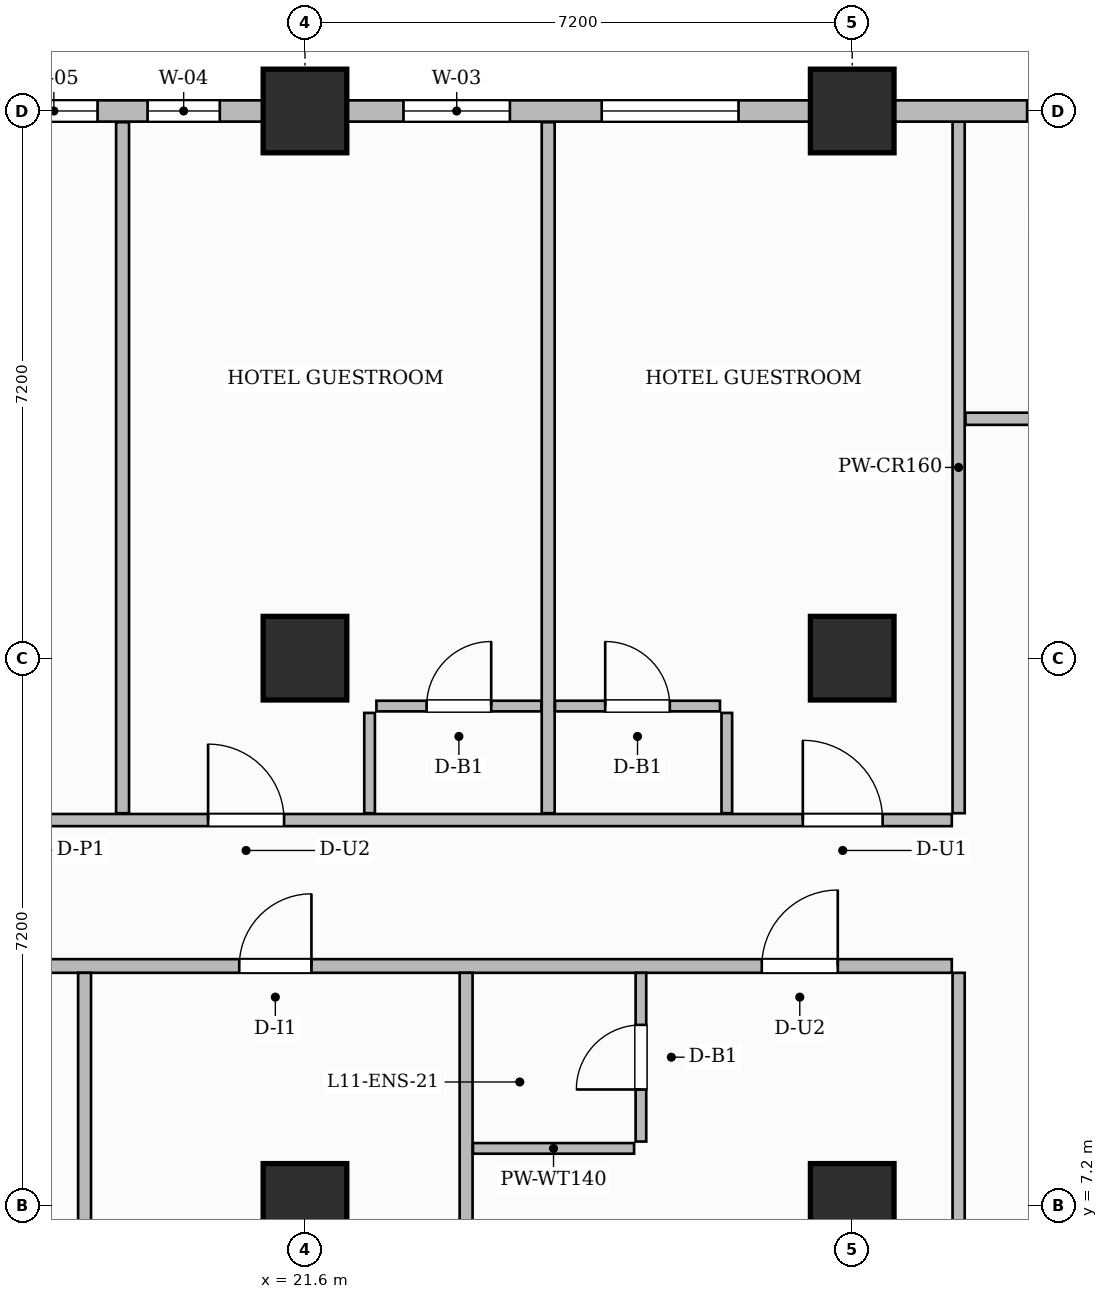
"""IFC4 building model, lengths in metres.
Left out: names, types, materials, properties, quantities, classifications, styles, units other than length and angle.
Written with IfcOpenShell. Run it as: python <this file> out.ifc"""

import sys

from ifc_helpers import new_model, si_unit, direction, frame, frame_2d, origin, origin_2d, place, context, subcontext, project, spatial, rectangle, extrude, source, transform, mapped, element, fill, save


model = new_model("IFC4")
c1 = context("Model", 3, precision=1e-05, world=origin(), true_north=direction((0.0, 1.0)))
c2 = subcontext(c1, "Body", "Model", "MODEL_VIEW")
j1 = project(units=[si_unit("LENGTHUNIT", "METRE"), si_unit("PLANEANGLEUNIT", "RADIAN")], contexts=[c1])
p1 = place(None, origin())
s1 = spatial("IfcSite", under=j1, at=p1, CompositionType="ELEMENT")
p2 = place(p1, origin())
s2 = spatial("IfcBuilding", under=s1, at=p2, CompositionType="ELEMENT")
p3 = place(p2, frame((0.0, 0.0, 50.9)))
s3 = spatial("IfcBuildingStorey", under=s2, at=p3, CompositionType="ELEMENT", Elevation=50.9)
m1 = source(origin(), c2, "Body", "SweptSolid", [
    extrude(rectangle(XDim=1.1, YDim=1.1, at=origin_2d()), origin(), (0.0, 0.0, 1.0), 3.7),
])
for number, where, z_axis, x_axis in (
    (1, (21.6, 7.2, 0.0), (0.0, 0.0, 1.0), (1.0, 0.0, 0.0)),
    (2, (21.6, 14.4, 0.0), (0.0, 0.0, 1.0), (1.0, 0.0, 0.0)),
    (3, (21.6, 21.6, 0.0), (0.0, 0.0, 1.0), (1.0, 0.0, 0.0)),
    (4, (28.8, 7.2, 0.0), (0.0, 0.0, 1.0), (1.0, 0.0, 0.0)),
    (5, (28.8, 14.4, 0.0), (0.0, 0.0, 1.0), (1.0, 0.0, 0.0)),
    (6, (28.8, 21.6, 0.0), (0.0, 0.0, 1.0), (1.0, 0.0, 0.0)),
):
    element("IfcColumn", number, at=place(p3, frame(where, z_axis=z_axis, x_axis=x_axis)), inside=s3, PredefinedType="COLUMN", context=c2, shape_type="MappedRepresentation", body=[
        mapped(m1, transform((0.0, 0.0, 0.0), scale=1.0)),
    ])
p4 = place(p3, frame((14.548, 10.35, 0.0), z_axis=(0.0, 0.0, 1.0), x_axis=(1.0, 0.0, 0.0)))
e7 = element("IfcWall", 7, at=p4, inside=s3, PredefinedType="PARTITIONING", context=c2, shape_type="SweptSolid", body=[
    extrude(rectangle(XDim=15.562, YDim=0.18, at=frame_2d((7.781, 0.0))), origin(), (0.0, 0.0, 1.0), 3.45),
])
p5 = place(p4, frame((1.302, 0.0, 0.0)))
e8 = element("IfcOpeningElement", 8, at=p5, cuts=e7, PredefinedType="OPENING", context=c2, shape_type="SweptSolid", body=[
    extrude(rectangle(XDim=1.4, YDim=2.35, at=frame_2d((0.7, 1.175))), frame((0.0, 0.1, 0.0), z_axis=(0.0, -1.0, 0.0), x_axis=(1.0, 0.0, 0.0)), (0.0, 0.0, 1.0), 0.2),
])
p6 = place(p4, frame((6.187, 0.0, 0.0)))
e9 = element("IfcOpeningElement", 9, at=p6, cuts=e7, PredefinedType="OPENING", context=c2, shape_type="SweptSolid", body=[
    extrude(rectangle(XDim=0.95, YDim=2.15, at=frame_2d((0.475, 1.075))), frame((0.0, 0.1, 0.0), z_axis=(0.0, -1.0, 0.0), x_axis=(1.0, 0.0, 0.0)), (0.0, 0.0, 1.0), 0.2),
])
p7 = place(p4, frame((13.062, 0.0, 0.0)))
e10 = element("IfcOpeningElement", 10, at=p7, cuts=e7, PredefinedType="OPENING", context=c2, shape_type="SweptSolid", body=[
    extrude(rectangle(XDim=1.0, YDim=2.2, at=frame_2d((0.5, 1.1))), frame((0.0, 0.1, 0.0), z_axis=(0.0, -1.0, 0.0), x_axis=(1.0, 0.0, 0.0)), (0.0, 0.0, 1.0), 0.2),
])
p8 = place(p3, frame((14.548, 12.27, 0.0), z_axis=(0.0, 0.0, 1.0), x_axis=(1.0, 0.0, 0.0)))
e11 = element("IfcWall", 11, at=p8, inside=s3, PredefinedType="PARTITIONING", context=c2, shape_type="SweptSolid", body=[
    extrude(rectangle(XDim=15.562, YDim=0.16, at=frame_2d((7.781, 0.0))), origin(), (0.0, 0.0, 1.0), 3.45),
])
p9 = place(p8, frame((1.602, 0.0, 0.0)))
e12 = element("IfcOpeningElement", 12, at=p9, cuts=e11, PredefinedType="OPENING", context=c2, shape_type="SweptSolid", body=[
    extrude(rectangle(XDim=1.4, YDim=2.35, at=frame_2d((0.7, 1.175))), frame((0.0, 0.09, 0.0), z_axis=(0.0, -1.0, 0.0), x_axis=(1.0, 0.0, 0.0)), (0.0, 0.0, 1.0), 0.18),
])
p10 = place(p8, frame((5.777, 0.0, 0.0)))
e13 = element("IfcOpeningElement", 13, at=p10, cuts=e11, PredefinedType="OPENING", context=c2, shape_type="SweptSolid", body=[
    extrude(rectangle(XDim=1.0, YDim=2.2, at=frame_2d((0.5, 1.1))), frame((0.0, 0.09, 0.0), z_axis=(0.0, -1.0, 0.0), x_axis=(1.0, 0.0, 0.0)), (0.0, 0.0, 1.0), 0.18),
])
p11 = place(p8, frame((13.602, 0.0, 0.0)))
e14 = element("IfcOpeningElement", 14, at=p11, cuts=e11, PredefinedType="OPENING", context=c2, shape_type="SweptSolid", body=[
    extrude(rectangle(XDim=1.05, YDim=2.25, at=frame_2d((0.525, 1.125))), frame((0.0, 0.09, 0.0), z_axis=(0.0, -1.0, 0.0), x_axis=(1.0, 0.0, 0.0)), (0.0, 0.0, 1.0), 0.18),
])
p12 = place(p3, frame((30.2, 12.36, 0.0), z_axis=(0.0, 0.0, 1.0), x_axis=(0.0, 1.0, 0.0)))
e15 = element("IfcWall", 15, at=p12, inside=s3, PredefinedType="PARTITIONING", context=c2, shape_type="SweptSolid", body=[
    extrude(rectangle(XDim=9.1, YDim=0.16, at=frame_2d((4.55, 0.0))), origin(), (0.0, 0.0, 1.0), 3.45),
])
p13 = place(p3, frame((30.29, 17.55, 0.0), z_axis=(0.0, 0.0, 1.0), x_axis=(1.0, 0.0, 0.0)))
e16 = element("IfcWall", 16, at=p13, inside=s3, PredefinedType="PARTITIONING", context=c2, shape_type="SweptSolid", body=[
    extrude(rectangle(XDim=19.37, YDim=0.16, at=frame_2d((9.685, 0.0))), origin(), (0.0, 0.0, 1.0), 3.45),
])
p14 = place(p13, frame((1.285, 0.0, 0.0)))
e17 = element("IfcOpeningElement", 17, at=p14, cuts=e16, PredefinedType="OPENING", context=c2, shape_type="SweptSolid", body=[
    extrude(rectangle(XDim=0.85, YDim=2.1, at=frame_2d((0.425, 1.05))), frame((0.0, 0.09, 0.0), z_axis=(0.0, -1.0, 0.0), x_axis=(1.0, 0.0, 0.0)), (0.0, 0.0, 1.0), 0.18),
])
p15 = place(p13, frame((10.66, 0.0, 0.0)))
e18 = element("IfcOpeningElement", 18, at=p15, cuts=e16, PredefinedType="OPENING", context=c2, shape_type="SweptSolid", body=[
    extrude(rectangle(XDim=1.6, YDim=2.4, at=frame_2d((0.8, 1.2))), frame((0.0, 0.09, 0.0), z_axis=(0.0, -1.0, 0.0), x_axis=(1.0, 0.0, 0.0)), (0.0, 0.0, 1.0), 0.18),
])
p16 = place(p3, frame((30.2, 0.148, 0.0), z_axis=(0.0, 0.0, 1.0), x_axis=(0.0, 1.0, 0.0)))
e19 = element("IfcWall", 19, at=p16, inside=s3, PredefinedType="PARTITIONING", context=c2, shape_type="SweptSolid", body=[
    extrude(rectangle(XDim=10.112, YDim=0.16, at=frame_2d((5.056, 0.0))), origin(), (0.0, 0.0, 1.0), 3.45),
])
p17 = place(p16, frame((1.977, 0.0, 0.0)))
e20 = element("IfcOpeningElement", 20, at=p17, cuts=e19, PredefinedType="OPENING", context=c2, shape_type="SweptSolid", body=[
    extrude(rectangle(XDim=1.05, YDim=2.15, at=frame_2d((0.525, 1.075))), frame((0.0, 0.09, 0.0), z_axis=(0.0, -1.0, 0.0), x_axis=(1.0, 0.0, 0.0)), (0.0, 0.0, 1.0), 0.18),
])
for number, where, z_axis, x_axis in (
    (21, (18.7, 0.148, 0.0), (0.0, 0.0, 1.0), (0.0, 1.0, 0.0)),
    (22, (23.72, 0.148, 0.0), (0.0, 0.0, 1.0), (0.0, 1.0, 0.0)),
):
    element("IfcWall", number, at=place(p3, frame(where, z_axis=z_axis, x_axis=x_axis)), inside=s3, PredefinedType="PARTITIONING", context=c2, shape_type="SweptSolid", body=[
        extrude(rectangle(XDim=10.112, YDim=0.17, at=frame_2d((5.056, 0.0))), origin(), (0.0, 0.0, 1.0), 3.45),
    ])
p18 = place(p3, frame((26.02, 8.04, 0.0), z_axis=(0.0, 0.0, 1.0), x_axis=(0.0, 1.0, 0.0)))
e23 = element("IfcWall", 23, at=p18, inside=s3, PredefinedType="PARTITIONING", context=c2, shape_type="SweptSolid", body=[
    extrude(rectangle(XDim=2.22, YDim=0.14, at=frame_2d((1.11, 0.0))), origin(), (0.0, 0.0, 1.0), 3.45),
])
p19 = place(p18, frame((0.685, 0.0, 0.0)))
e24 = element("IfcOpeningElement", 24, at=p19, cuts=e23, PredefinedType="OPENING", context=c2, shape_type="SweptSolid", body=[
    extrude(rectangle(XDim=0.85, YDim=2.1, at=frame_2d((0.425, 1.05))), frame((0.0, 0.08, 0.0), z_axis=(0.0, -1.0, 0.0), x_axis=(1.0, 0.0, 0.0)), (0.0, 0.0, 1.0), 0.16),
])
p20 = place(p3, frame((23.81, 7.95, 0.0), z_axis=(0.0, 0.0, 1.0), x_axis=(1.0, 0.0, 0.0)))
e25 = element("IfcWall", 25, at=p20, inside=s3, PredefinedType="PARTITIONING", context=c2, shape_type="SweptSolid", body=[
    extrude(rectangle(XDim=2.12, YDim=0.14, at=frame_2d((1.06, 0.0))), origin(), (0.0, 0.0, 1.0), 3.45),
])
for number, where, z_axis, x_axis in (
    (26, (19.2, 12.36, 0.0), (0.0, 0.0, 1.0), (0.0, 1.0, 0.0)),
    (27, (24.8, 12.36, 0.0), (0.0, 0.0, 1.0), (0.0, 1.0, 0.0)),
):
    element("IfcWall", number, at=place(p3, frame(where, z_axis=z_axis, x_axis=x_axis)), inside=s3, PredefinedType="PARTITIONING", context=c2, shape_type="SweptSolid", body=[
        extrude(rectangle(XDim=9.092, YDim=0.17, at=frame_2d((4.546, 0.0))), origin(), (0.0, 0.0, 1.0), 3.45),
    ])
p21 = place(p3, frame((22.45, 12.36, 0.0), z_axis=(0.0, 0.0, 1.0), x_axis=(0.0, 1.0, 0.0)))
e28 = element("IfcWall", 28, at=p21, inside=s3, PredefinedType="PARTITIONING", context=c2, shape_type="SweptSolid", body=[
    extrude(rectangle(XDim=1.32, YDim=0.14, at=frame_2d((0.66, 0.0))), origin(), (0.0, 0.0, 1.0), 3.45),
])
p22 = place(p3, frame((22.54, 13.77, 0.0), z_axis=(0.0, 0.0, 1.0), x_axis=(1.0, 0.0, 0.0)))
e29 = element("IfcWall", 29, at=p22, inside=s3, PredefinedType="PARTITIONING", context=c2, shape_type="SweptSolid", body=[
    extrude(rectangle(XDim=2.17, YDim=0.14, at=frame_2d((1.085, 0.0))), origin(), (0.0, 0.0, 1.0), 3.45),
])
p23 = place(p22, frame((0.66, 0.0, 0.0)))
e30 = element("IfcOpeningElement", 30, at=p23, cuts=e29, PredefinedType="OPENING", context=c2, shape_type="SweptSolid", body=[
    extrude(rectangle(XDim=0.85, YDim=2.1, at=frame_2d((0.425, 1.05))), frame((0.0, 0.08, 0.0), z_axis=(0.0, -1.0, 0.0), x_axis=(1.0, 0.0, 0.0)), (0.0, 0.0, 1.0), 0.16),
])
p24 = place(p3, frame((27.15, 12.36, 0.0), z_axis=(0.0, 0.0, 1.0), x_axis=(0.0, 1.0, 0.0)))
e31 = element("IfcWall", 31, at=p24, inside=s3, PredefinedType="PARTITIONING", context=c2, shape_type="SweptSolid", body=[
    extrude(rectangle(XDim=1.32, YDim=0.14, at=frame_2d((0.66, 0.0))), origin(), (0.0, 0.0, 1.0), 3.45),
])
p25 = place(p3, frame((24.89, 13.77, 0.0), z_axis=(0.0, 0.0, 1.0), x_axis=(1.0, 0.0, 0.0)))
e32 = element("IfcWall", 32, at=p25, inside=s3, PredefinedType="PARTITIONING", context=c2, shape_type="SweptSolid", body=[
    extrude(rectangle(XDim=2.17, YDim=0.14, at=frame_2d((1.085, 0.0))), origin(), (0.0, 0.0, 1.0), 3.45),
])
p26 = place(p25, frame((0.66, 0.0, 0.0)))
e33 = element("IfcOpeningElement", 33, at=p26, cuts=e32, PredefinedType="OPENING", context=c2, shape_type="SweptSolid", body=[
    extrude(rectangle(XDim=0.85, YDim=2.1, at=frame_2d((0.425, 1.05))), frame((0.0, 0.08, 0.0), z_axis=(0.0, -1.0, 0.0), x_axis=(1.0, 0.0, 0.0)), (0.0, 0.0, 1.0), 0.16),
])
p27 = place(p3, frame((14.4, 21.6, 0.0), z_axis=(0.0, 0.0, 1.0), x_axis=(1.0, 0.0, 0.0)))
e34 = element("IfcWall", 34, at=p27, inside=s3, PredefinedType="SOLIDWALL", context=c2, shape_type="SweptSolid", body=[
    extrude(rectangle(XDim=43.2, YDim=0.28, at=frame_2d((21.6, 0.0))), origin(), (0.0, 0.0, 1.0), 2.885),
])
p28 = place(p27, frame((1.5, 0.0, 0.0)))
e35 = element("IfcOpeningElement", 35, at=p28, cuts=e34, PredefinedType="OPENING", context=c2, shape_type="SweptSolid", body=[
    extrude(rectangle(XDim=1.2, YDim=2.2, at=frame_2d((0.6, 1.1))), frame((0.0, 0.15, 0.0), z_axis=(0.0, -1.0, 0.0), x_axis=(1.0, 0.0, 0.0)), (0.0, 0.0, 1.0), 0.3),
])
p29 = place(p27, frame((3.321, 0.0, 0.8)))
e36 = element("IfcOpeningElement", 36, at=p29, cuts=e34, PredefinedType="OPENING", context=c2, shape_type="SweptSolid", body=[
    extrude(rectangle(XDim=1.15, YDim=1.8, at=frame_2d((0.575, 0.9))), frame((0.0, 0.15, 0.0), z_axis=(0.0, -1.0, 0.0), x_axis=(1.0, 0.0, 0.0)), (0.0, 0.0, 1.0), 0.3),
])
p30 = place(p27, frame((5.129, 0.0, 0.8)))
e37 = element("IfcOpeningElement", 37, at=p30, cuts=e34, PredefinedType="OPENING", context=c2, shape_type="SweptSolid", body=[
    extrude(rectangle(XDim=0.95, YDim=1.75, at=frame_2d((0.475, 0.875))), frame((0.0, 0.15, 0.0), z_axis=(0.0, -1.0, 0.0), x_axis=(1.0, 0.0, 0.0)), (0.0, 0.0, 1.0), 0.3),
])
p31 = place(p27, frame((8.496, 0.0, 0.8)))
e38 = element("IfcOpeningElement", 38, at=p31, cuts=e34, PredefinedType="OPENING", context=c2, shape_type="SweptSolid", body=[
    extrude(rectangle(XDim=1.4, YDim=1.85, at=frame_2d((0.7, 0.925))), frame((0.0, 0.15, 0.0), z_axis=(0.0, -1.0, 0.0), x_axis=(1.0, 0.0, 0.0)), (0.0, 0.0, 1.0), 0.3),
])
p32 = place(p27, frame((11.104, 0.0, 0.8)))
e39 = element("IfcOpeningElement", 39, at=p32, cuts=e34, PredefinedType="OPENING", context=c2, shape_type="SweptSolid", body=[
    extrude(rectangle(XDim=1.8, YDim=1.85, at=frame_2d((0.9, 0.925))), frame((0.0, 0.15, 0.0), z_axis=(0.0, -1.0, 0.0), x_axis=(1.0, 0.0, 0.0)), (0.0, 0.0, 1.0), 0.3),
])
p33 = place(p27, frame((16.701, 0.0, 0.8)))
e40 = element("IfcOpeningElement", 40, at=p33, cuts=e34, PredefinedType="OPENING", context=c2, shape_type="SweptSolid", body=[
    extrude(rectangle(XDim=1.8, YDim=1.85, at=frame_2d((0.9, 0.925))), frame((0.0, 0.15, 0.0), z_axis=(0.0, -1.0, 0.0), x_axis=(1.0, 0.0, 0.0)), (0.0, 0.0, 1.0), 0.3),
])
p34 = place(p27, frame((21.725, 0.0, 0.8)))
e41 = element("IfcOpeningElement", 41, at=p34, cuts=e34, PredefinedType="OPENING", context=c2, shape_type="SweptSolid", body=[
    extrude(rectangle(XDim=1.8, YDim=1.85, at=frame_2d((0.9, 0.925))), frame((0.0, 0.15, 0.0), z_axis=(0.0, -1.0, 0.0), x_axis=(1.0, 0.0, 0.0)), (0.0, 0.0, 1.0), 0.3),
])
p35 = place(p27, frame((24.475, 0.0, 0.8)))
e42 = element("IfcOpeningElement", 42, at=p35, cuts=e34, PredefinedType="OPENING", context=c2, shape_type="SweptSolid", body=[
    extrude(rectangle(XDim=1.8, YDim=1.85, at=frame_2d((0.9, 0.925))), frame((0.0, 0.15, 0.0), z_axis=(0.0, -1.0, 0.0), x_axis=(1.0, 0.0, 0.0)), (0.0, 0.0, 1.0), 0.3),
])
p36 = place(p27, frame((29.075, 0.0, 0.8)))
e43 = element("IfcOpeningElement", 43, at=p36, cuts=e34, PredefinedType="OPENING", context=c2, shape_type="SweptSolid", body=[
    extrude(rectangle(XDim=1.8, YDim=1.85, at=frame_2d((0.9, 0.925))), frame((0.0, 0.15, 0.0), z_axis=(0.0, -1.0, 0.0), x_axis=(1.0, 0.0, 0.0)), (0.0, 0.0, 1.0), 0.3),
])
p37 = place(p27, frame((32.125, 0.0, 0.8)))
e44 = element("IfcOpeningElement", 44, at=p37, cuts=e34, PredefinedType="OPENING", context=c2, shape_type="SweptSolid", body=[
    extrude(rectangle(XDim=1.8, YDim=1.85, at=frame_2d((0.9, 0.925))), frame((0.0, 0.15, 0.0), z_axis=(0.0, -1.0, 0.0), x_axis=(1.0, 0.0, 0.0)), (0.0, 0.0, 1.0), 0.3),
])
p38 = place(p27, frame((36.875, 0.0, 0.8)))
e45 = element("IfcOpeningElement", 45, at=p38, cuts=e34, PredefinedType="OPENING", context=c2, shape_type="SweptSolid", body=[
    extrude(rectangle(XDim=1.8, YDim=1.85, at=frame_2d((0.9, 0.925))), frame((0.0, 0.15, 0.0), z_axis=(0.0, -1.0, 0.0), x_axis=(1.0, 0.0, 0.0)), (0.0, 0.0, 1.0), 0.3),
])
p39 = place(p27, frame((39.925, 0.0, 0.8)))
e46 = element("IfcOpeningElement", 46, at=p39, cuts=e34, PredefinedType="OPENING", context=c2, shape_type="SweptSolid", body=[
    extrude(rectangle(XDim=1.8, YDim=1.85, at=frame_2d((0.9, 0.925))), frame((0.0, 0.15, 0.0), z_axis=(0.0, -1.0, 0.0), x_axis=(1.0, 0.0, 0.0)), (0.0, 0.0, 1.0), 0.3),
])
m2 = source(origin(), c2, "Body", "SweptSolid", [
    extrude(rectangle(XDim=0.95, YDim=2.15, at=frame_2d((0.475, 1.075))), frame((0.0, 0.025, 0.0), z_axis=(0.0, -1.0, 0.0), x_axis=(1.0, 0.0, 0.0)), (0.0, 0.0, 1.0), 0.05),
])
p40 = place(p6, origin())
e47 = element("IfcDoor", 47, at=p40, inside=s3, OperationType="SINGLE_SWING_RIGHT", PredefinedType="DOOR", context=c2, shape_type="MappedRepresentation", body=[
    mapped(m2, transform((0.0, 0.0, 0.0), scale=1.0)),
])
fill(e9, e47)
m3 = source(origin(), c2, "Body", "SweptSolid", [
    extrude(rectangle(XDim=0.85, YDim=2.1, at=frame_2d((0.425, 1.05))), frame((0.0, 0.025, 0.0), z_axis=(0.0, -1.0, 0.0), x_axis=(1.0, 0.0, 0.0)), (0.0, 0.0, 1.0), 0.05),
])
p41 = place(p19, origin())
e48 = element("IfcDoor", 48, at=p41, inside=s3, OperationType="SINGLE_SWING_LEFT", PredefinedType="DOOR", context=c2, shape_type="MappedRepresentation", body=[
    mapped(m3, transform((0.0, 0.0, 0.0), scale=1.0)),
])
fill(e24, e48)
m4 = source(origin(), c2, "Body", "SweptSolid", [
    extrude(rectangle(XDim=1.0, YDim=2.2, at=frame_2d((0.5, 1.1))), frame((0.0, 0.025, 0.0), z_axis=(0.0, -1.0, 0.0), x_axis=(1.0, 0.0, 0.0)), (0.0, 0.0, 1.0), 0.05),
])
p42 = place(p7, origin())
e49 = element("IfcDoor", 49, at=p42, inside=s3, OperationType="SINGLE_SWING_RIGHT", PredefinedType="DOOR", context=c2, shape_type="MappedRepresentation", body=[
    mapped(m4, transform((0.0, 0.0, 0.0), scale=1.0)),
])
fill(e10, e49)
p43 = place(p23, origin())
e50 = element("IfcDoor", 50, at=p43, inside=s3, OperationType="SINGLE_SWING_RIGHT", PredefinedType="DOOR", context=c2, shape_type="MappedRepresentation", body=[
    mapped(m3, transform((0.0, 0.0, 0.0), scale=1.0)),
])
fill(e30, e50)
p44 = place(p10, origin())
e51 = element("IfcDoor", 51, at=p44, inside=s3, OperationType="SINGLE_SWING_LEFT", PredefinedType="DOOR", context=c2, shape_type="MappedRepresentation", body=[
    mapped(m4, transform((0.0, 0.0, 0.0), scale=1.0)),
])
fill(e13, e51)
p45 = place(p26, origin())
e52 = element("IfcDoor", 52, at=p45, inside=s3, OperationType="SINGLE_SWING_LEFT", PredefinedType="DOOR", context=c2, shape_type="MappedRepresentation", body=[
    mapped(m3, transform((0.0, 0.0, 0.0), scale=1.0)),
])
fill(e33, e52)
m5 = source(origin(), c2, "Body", "SweptSolid", [
    extrude(rectangle(XDim=1.05, YDim=2.25, at=frame_2d((0.525, 1.125))), frame((0.0, 0.025, 0.0), z_axis=(0.0, -1.0, 0.0), x_axis=(1.0, 0.0, 0.0)), (0.0, 0.0, 1.0), 0.05),
])
p46 = place(p11, origin())
e53 = element("IfcDoor", 53, at=p46, inside=s3, OperationType="SINGLE_SWING_LEFT", PredefinedType="DOOR", context=c2, shape_type="MappedRepresentation", body=[
    mapped(m5, transform((0.0, 0.0, 0.0), scale=1.0)),
])
fill(e14, e53)
m6 = source(origin(), c2, "Body", "SweptSolid", [
    extrude(rectangle(XDim=1.15, YDim=1.8, at=frame_2d((0.575, 0.9))), frame((0.0, 0.03, 0.0), z_axis=(0.0, -1.0, 0.0), x_axis=(1.0, 0.0, 0.0)), (0.0, 0.0, 1.0), 0.06),
])
p47 = place(p29, origin())
e54 = element("IfcWindow", 54, at=p47, inside=s3, PartitioningType="SINGLE_PANEL", PredefinedType="WINDOW", context=c2, shape_type="MappedRepresentation", body=[
    mapped(m6, transform((0.0, 0.0, 0.0), scale=1.0)),
])
fill(e36, e54)
m7 = source(origin(), c2, "Body", "SweptSolid", [
    extrude(rectangle(XDim=0.95, YDim=1.75, at=frame_2d((0.475, 0.875))), frame((0.0, 0.03, 0.0), z_axis=(0.0, -1.0, 0.0), x_axis=(1.0, 0.0, 0.0)), (0.0, 0.0, 1.0), 0.06),
])
p48 = place(p30, origin())
e55 = element("IfcWindow", 55, at=p48, inside=s3, PartitioningType="SINGLE_PANEL", PredefinedType="WINDOW", context=c2, shape_type="MappedRepresentation", body=[
    mapped(m7, transform((0.0, 0.0, 0.0), scale=1.0)),
])
fill(e37, e55)
m8 = source(origin(), c2, "Body", "SweptSolid", [
    extrude(rectangle(XDim=1.4, YDim=1.85, at=frame_2d((0.7, 0.925))), frame((0.0, 0.03, 0.0), z_axis=(0.0, -1.0, 0.0), x_axis=(1.0, 0.0, 0.0)), (0.0, 0.0, 1.0), 0.06),
])
p49 = place(p31, origin())
e56 = element("IfcWindow", 56, at=p49, inside=s3, PartitioningType="SINGLE_PANEL", PredefinedType="WINDOW", context=c2, shape_type="MappedRepresentation", body=[
    mapped(m8, transform((0.0, 0.0, 0.0), scale=1.0)),
])
fill(e38, e56)
m9 = source(origin(), c2, "Body", "SweptSolid", [
    extrude(rectangle(XDim=1.8, YDim=1.85, at=frame_2d((0.9, 0.925))), frame((0.0, 0.03, 0.0), z_axis=(0.0, -1.0, 0.0), x_axis=(1.0, 0.0, 0.0)), (0.0, 0.0, 1.0), 0.06),
])
p50 = place(p32, origin())
e57 = element("IfcWindow", 57, at=p50, inside=s3, PartitioningType="DOUBLE_PANEL_VERTICAL", PredefinedType="WINDOW", context=c2, shape_type="MappedRepresentation", body=[
    mapped(m9, transform((0.0, 0.0, 0.0), scale=1.0)),
])
fill(e39, e57)
p51 = place(p33, origin())
e58 = element("IfcWindow", 58, at=p51, inside=s3, PartitioningType="DOUBLE_PANEL_VERTICAL", PredefinedType="WINDOW", context=c2, shape_type="MappedRepresentation", body=[
    mapped(m9, transform((0.0, 0.0, 0.0), scale=1.0)),
])
fill(e40, e58)
save(model, sys.argv[1])
